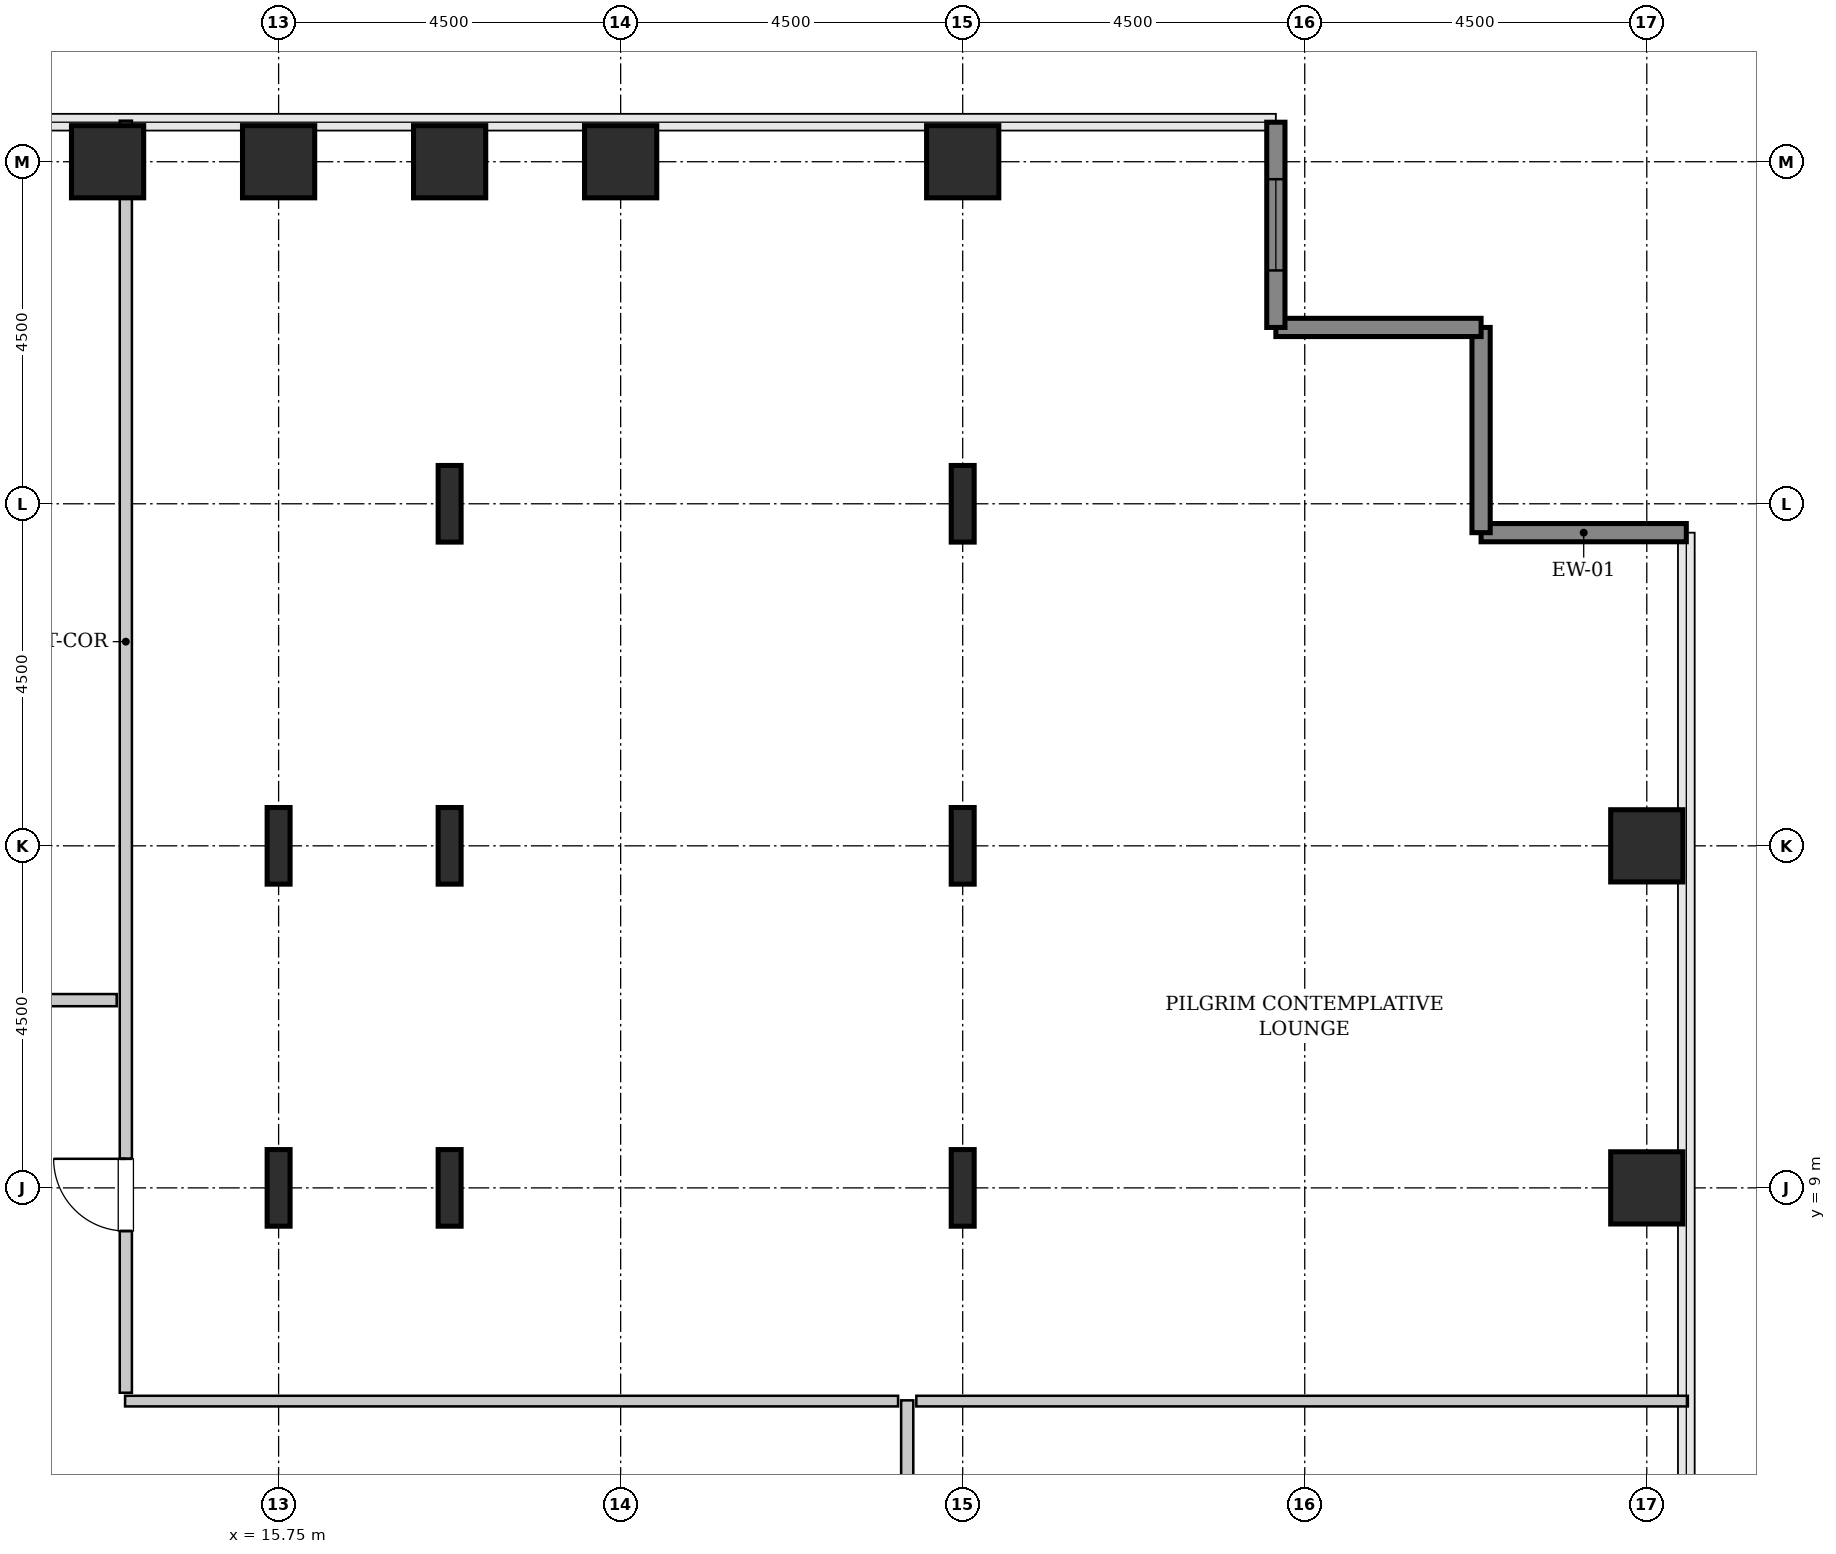
"""IFC4 building model, lengths in metres.
Left out: names, types, materials, properties, quantities, classifications, styles, units other than length and angle.
Written with IfcOpenShell. Run it as: python <this file> out.ifc"""

import sys

from ifc_helpers import new_model, si_unit, direction, frame, frame_2d, origin, origin_2d, place, context, subcontext, project, spatial, rectangle, hollow_rectangle, i_section, extrude, source, transform, mapped, element, fill, save


model = new_model("IFC4")
c1 = context("Model", 3, precision=1e-05, world=origin(), true_north=direction((0.0, 1.0)))
c2 = subcontext(c1, "Body", "Model", "MODEL_VIEW")
j1 = project(units=[si_unit("LENGTHUNIT", "METRE"), si_unit("PLANEANGLEUNIT", "RADIAN")], contexts=[c1])
p1 = place(None, origin())
s1 = spatial("IfcSite", under=j1, at=p1, CompositionType="ELEMENT")
p2 = place(p1, origin())
s2 = spatial("IfcBuilding", under=s1, at=p2, CompositionType="ELEMENT")
p3 = place(p2, frame((0.0, 0.0, 48.2)))
s3 = spatial("IfcBuildingStorey", under=s2, at=p3, CompositionType="ELEMENT", Elevation=48.2)
m1 = source(origin(), c2, "Body", "SweptSolid", [
    extrude(hollow_rectangle(XDim=0.95, YDim=0.95, WallThickness=0.045, InnerFilletRadius=0.045, OuterFilletRadius=0.09, at=origin_2d()), origin(), (0.0, 0.0, 1.0), 3.8),
])
p4 = place(p3, frame((13.5, 22.5, 0.0), z_axis=(0.0, 0.0, 1.0), x_axis=(1.0, 0.0, 0.0)))
e1 = element("IfcColumn", 1, at=p4, inside=s3, PredefinedType="COLUMN", context=c2, shape_type="MappedRepresentation", body=[
    mapped(m1, transform((0.0, 0.0, 0.0), x_axis=(1.0, 0.0, 0.0), y_axis=(0.0, 1.0, 0.0), z_axis=(0.0, 0.0, 1.0), scale=1.0)),
])
m2 = source(origin(), c2, "Body", "SweptSolid", [
    extrude(i_section(OverallWidth=0.302, OverallDepth=1.008, WebThickness=0.021, FlangeThickness=0.04, FilletRadius=0.03, at=origin_2d()), origin(), (0.0, 0.0, 1.0), 3.8),
])
for number, where, z_axis, x_axis in (
    (2, (15.75, 9.0, 0.0), (0.0, 0.0, 1.0), (1.0, 0.0, 0.0)),
    (3, (15.75, 13.5, 0.0), (0.0, 0.0, 1.0), (1.0, 0.0, 0.0)),
):
    element("IfcColumn", number, at=place(p3, frame(where, z_axis=z_axis, x_axis=x_axis)), inside=s3, PredefinedType="COLUMN", context=c2, shape_type="MappedRepresentation", body=[
        mapped(m2, transform((0.0, 0.0, 0.0), x_axis=(1.0, 0.0, 0.0), y_axis=(0.0, 1.0, 0.0), z_axis=(0.0, 0.0, 1.0), scale=1.0)),
    ])
p5 = place(p3, frame((15.75, 22.5, 0.0), z_axis=(0.0, 0.0, 1.0), x_axis=(1.0, 0.0, 0.0)))
e4 = element("IfcColumn", 4, at=p5, inside=s3, PredefinedType="COLUMN", context=c2, shape_type="MappedRepresentation", body=[
    mapped(m1, transform((0.0, 0.0, 0.0), x_axis=(1.0, 0.0, 0.0), y_axis=(0.0, 1.0, 0.0), z_axis=(0.0, 0.0, 1.0), scale=1.0)),
])
for number, where, z_axis, x_axis in (
    (5, (18.0, 9.0, 0.0), (0.0, 0.0, 1.0), (1.0, 0.0, 0.0)),
    (6, (18.0, 13.5, 0.0), (0.0, 0.0, 1.0), (1.0, 0.0, 0.0)),
    (7, (18.0, 18.0, 0.0), (0.0, 0.0, 1.0), (1.0, 0.0, 0.0)),
):
    element("IfcColumn", number, at=place(p3, frame(where, z_axis=z_axis, x_axis=x_axis)), inside=s3, PredefinedType="COLUMN", context=c2, shape_type="MappedRepresentation", body=[
        mapped(m2, transform((0.0, 0.0, 0.0), x_axis=(1.0, 0.0, 0.0), y_axis=(0.0, 1.0, 0.0), z_axis=(0.0, 0.0, 1.0), scale=1.0)),
    ])
for number, where, z_axis, x_axis in (
    (8, (18.0, 22.5, 0.0), (0.0, 0.0, 1.0), (1.0, 0.0, 0.0)),
    (9, (20.25, 22.5, 0.0), (0.0, 0.0, 1.0), (1.0, 0.0, 0.0)),
):
    element("IfcColumn", number, at=place(p3, frame(where, z_axis=z_axis, x_axis=x_axis)), inside=s3, PredefinedType="COLUMN", context=c2, shape_type="MappedRepresentation", body=[
        mapped(m1, transform((0.0, 0.0, 0.0), x_axis=(1.0, 0.0, 0.0), y_axis=(0.0, 1.0, 0.0), z_axis=(0.0, 0.0, 1.0), scale=1.0)),
    ])
for number, where, z_axis, x_axis in (
    (10, (24.75, 9.0, 0.0), (0.0, 0.0, 1.0), (1.0, 0.0, 0.0)),
    (11, (24.75, 13.5, 0.0), (0.0, 0.0, 1.0), (1.0, 0.0, 0.0)),
    (12, (24.75, 18.0, 0.0), (0.0, 0.0, 1.0), (1.0, 0.0, 0.0)),
):
    element("IfcColumn", number, at=place(p3, frame(where, z_axis=z_axis, x_axis=x_axis)), inside=s3, PredefinedType="COLUMN", context=c2, shape_type="MappedRepresentation", body=[
        mapped(m2, transform((0.0, 0.0, 0.0), x_axis=(1.0, 0.0, 0.0), y_axis=(0.0, 1.0, 0.0), z_axis=(0.0, 0.0, 1.0), scale=1.0)),
    ])
for number, where, z_axis, x_axis in (
    (13, (24.75, 22.5, 0.0), (0.0, 0.0, 1.0), (1.0, 0.0, 0.0)),
    (14, (33.75, 9.0, 0.0), (0.0, 0.0, 1.0), (1.0, 0.0, 0.0)),
    (15, (33.75, 13.5, 0.0), (0.0, 0.0, 1.0), (1.0, 0.0, 0.0)),
):
    element("IfcColumn", number, at=place(p3, frame(where, z_axis=z_axis, x_axis=x_axis)), inside=s3, PredefinedType="COLUMN", context=c2, shape_type="MappedRepresentation", body=[
        mapped(m1, transform((0.0, 0.0, 0.0), x_axis=(1.0, 0.0, 0.0), y_axis=(0.0, 1.0, 0.0), z_axis=(0.0, 0.0, 1.0), scale=1.0)),
    ])
m3 = source(origin(), c2, "Body", "SweptSolid", [
    extrude(rectangle(XDim=2.7, YDim=0.24, at=frame_2d((1.35, 0.0))), origin(), (0.0, 0.0, 1.0), 3.55),
])
for number, where, z_axis, x_axis in (
    (16, (34.27, 17.62, 0.0), (0.0, 0.0, 1.0), (-1.0, 0.0, 0.0)),
    (17, (31.57, 17.62, 0.0), (0.0, 0.0, 1.0), (0.0, 1.0, 0.0)),
    (18, (31.57, 20.32, 0.0), (0.0, 0.0, 1.0), (-1.0, 0.0, 0.0)),
):
    element("IfcWall", number, at=place(p3, frame(where, z_axis=z_axis, x_axis=x_axis)), inside=s3, PredefinedType="SHEAR", context=c2, shape_type="MappedRepresentation", body=[
        mapped(m3, transform((0.0, 0.0, 0.0), x_axis=(1.0, 0.0, 0.0), y_axis=(0.0, 1.0, 0.0), z_axis=(0.0, 0.0, 1.0), scale=1.0)),
    ])
p6 = place(p3, frame((28.87, 20.32, 0.0), z_axis=(0.0, 0.0, 1.0), x_axis=(0.0, 1.0, 0.0)))
e19 = element("IfcWall", 19, at=p6, inside=s3, PredefinedType="SHEAR", context=c2, shape_type="MappedRepresentation", body=[
    mapped(m3, transform((0.0, 0.0, 0.0), x_axis=(1.0, 0.0, 0.0), y_axis=(0.0, 1.0, 0.0), z_axis=(0.0, 0.0, 1.0), scale=1.0)),
])
p7 = place(p6, frame((0.75, 0.0, 0.85)))
e20 = element("IfcOpeningElement", 20, at=p7, cuts=e19, PredefinedType="OPENING", context=c2, shape_type="SweptSolid", body=[
    extrude(rectangle(XDim=1.2, YDim=1.8, at=frame_2d((0.6, 0.9))), frame((0.0, 0.13, 0.0), z_axis=(0.0, -1.0, 0.0), x_axis=(1.0, 0.0, 0.0)), (0.0, 0.0, 1.0), 0.26),
])
m4 = source(origin(), c2, "Body", "SweptSolid", [
    extrude(rectangle(XDim=13.3, YDim=0.16, at=frame_2d((6.65, 0.0))), origin(), (0.0, 0.0, 1.0), 3.535),
])
p8 = place(p3, frame((24.02, -7.095, 0.0), z_axis=(0.0, 0.0, 1.0), x_axis=(0.0, 1.0, 0.0)))
e21 = element("IfcWall", 21, at=p8, inside=s3, PredefinedType="PARTITIONING", context=c2, shape_type="MappedRepresentation", body=[
    mapped(m4, transform((0.0, 0.0, 0.0), x_axis=(1.0, 0.0, 0.0), y_axis=(0.0, 1.0, 0.0), z_axis=(0.0, 0.0, 1.0), scale=1.0)),
])
p9 = place(p8, frame((8.87, 0.0, 0.0)))
e22 = element("IfcOpeningElement", 22, at=p9, cuts=e21, PredefinedType="OPENING", context=c2, shape_type="SweptSolid", body=[
    extrude(rectangle(XDim=0.95, YDim=2.1, at=frame_2d((0.475, 1.05))), frame((0.0, 0.09, 0.0), z_axis=(0.0, -1.0, 0.0), x_axis=(1.0, 0.0, 0.0)), (0.0, 0.0, 1.0), 0.18),
])
m5 = source(origin(), c2, "Body", "SweptSolid", [
    extrude(rectangle(XDim=10.17, YDim=0.14, at=frame_2d((5.085, 0.0))), origin(), (0.0, 0.0, 1.0), 3.535),
])
p10 = place(p3, frame((13.73, 6.195, 0.0), z_axis=(0.0, 0.0, 1.0), x_axis=(1.0, 0.0, 0.0)))
e23 = element("IfcWall", 23, at=p10, inside=s3, PredefinedType="PARTITIONING", context=c2, shape_type="MappedRepresentation", body=[
    mapped(m5, transform((0.0, 0.0, 0.0), x_axis=(1.0, 0.0, 0.0), y_axis=(0.0, 1.0, 0.0), z_axis=(0.0, 0.0, 1.0), scale=1.0)),
])
m6 = source(origin(), c2, "Body", "SweptSolid", [
    extrude(rectangle(XDim=10.15, YDim=0.14, at=frame_2d((5.075, 0.0))), origin(), (0.0, 0.0, 1.0), 3.535),
])
p11 = place(p3, frame((24.14, 6.195, 0.0), z_axis=(0.0, 0.0, 1.0), x_axis=(1.0, 0.0, 0.0)))
e24 = element("IfcWall", 24, at=p11, inside=s3, PredefinedType="PARTITIONING", context=c2, shape_type="MappedRepresentation", body=[
    mapped(m6, transform((0.0, 0.0, 0.0), x_axis=(1.0, 0.0, 0.0), y_axis=(0.0, 1.0, 0.0), z_axis=(0.0, 0.0, 1.0), scale=1.0)),
])
m7 = source(origin(), c2, "Body", "SweptSolid", [
    extrude(rectangle(XDim=16.735, YDim=0.16, at=frame_2d((8.368, 0.0))), origin(), (0.0, 0.0, 1.0), 3.535),
])
p12 = place(p3, frame((13.74, 6.305, 0.0), z_axis=(0.0, 0.0, 1.0), x_axis=(0.0, 1.0, 0.0)))
e25 = element("IfcWall", 25, at=p12, inside=s3, PredefinedType="PARTITIONING", context=c2, shape_type="MappedRepresentation", body=[
    mapped(m7, transform((0.0, 0.0, 0.0), x_axis=(1.0, 0.0, 0.0), y_axis=(0.0, 1.0, 0.0), z_axis=(0.0, 0.0, 1.0), scale=1.0)),
])
p13 = place(p12, frame((2.127, 0.0, 0.0)))
e26 = element("IfcOpeningElement", 26, at=p13, cuts=e25, PredefinedType="OPENING", context=c2, shape_type="SweptSolid", body=[
    extrude(rectangle(XDim=0.95, YDim=2.1, at=frame_2d((0.475, 1.05))), frame((0.0, 0.09, 0.0), z_axis=(0.0, -1.0, 0.0), x_axis=(1.0, 0.0, 0.0)), (0.0, 0.0, 1.0), 0.18),
])
m8 = source(origin(), c2, "Body", "SweptSolid", [
    extrude(rectangle(XDim=6.825, YDim=0.16, at=frame_2d((3.413, 0.0))), origin(), (0.0, 0.0, 1.0), 3.535),
])
p14 = place(p3, frame((6.795, 11.47, 0.0), z_axis=(0.0, 0.0, 1.0), x_axis=(1.0, 0.0, 0.0)))
e27 = element("IfcWall", 27, at=p14, inside=s3, PredefinedType="PARTITIONING", context=c2, shape_type="MappedRepresentation", body=[
    mapped(m8, transform((0.0, 0.0, 0.0), x_axis=(1.0, 0.0, 0.0), y_axis=(0.0, 1.0, 0.0), z_axis=(0.0, 0.0, 1.0), scale=1.0)),
])
p15 = place(p14, frame((2.938, 0.0, 0.0)))
e28 = element("IfcOpeningElement", 28, at=p15, cuts=e27, PredefinedType="OPENING", context=c2, shape_type="SweptSolid", body=[
    extrude(rectangle(XDim=0.95, YDim=2.1, at=frame_2d((0.475, 1.05))), frame((0.0, 0.09, 0.0), z_axis=(0.0, -1.0, 0.0), x_axis=(1.0, 0.0, 0.0)), (0.0, 0.0, 1.0), 0.18),
])
m9 = source(origin(), c2, "Body", "SweptSolid", [
    extrude(rectangle(XDim=1.2, YDim=1.8, at=frame_2d((0.6, 0.9))), frame((0.0, 0.03, 0.0), z_axis=(0.0, -1.0, 0.0), x_axis=(1.0, 0.0, 0.0)), (0.0, 0.0, 1.0), 0.06),
])
p16 = place(p7, origin())
e29 = element("IfcWindow", 29, at=p16, inside=s3, PartitioningType="SINGLE_PANEL", PredefinedType="WINDOW", context=c2, shape_type="MappedRepresentation", body=[
    mapped(m9, transform((0.0, 0.0, 0.0), x_axis=(1.0, 0.0, 0.0), y_axis=(0.0, 1.0, 0.0), z_axis=(0.0, 0.0, 1.0), scale=1.0)),
])
fill(e20, e29)
m10 = source(origin(), c2, "Body", "SweptSolid", [
    extrude(rectangle(XDim=0.95, YDim=2.1, at=frame_2d((0.475, 1.05))), frame((0.0, 0.025, 0.0), z_axis=(0.0, -1.0, 0.0), x_axis=(1.0, 0.0, 0.0)), (0.0, 0.0, 1.0), 0.05),
])
p17 = place(p13, origin())
e30 = element("IfcDoor", 30, at=p17, inside=s3, OperationType="SINGLE_SWING_RIGHT", PredefinedType="DOOR", context=c2, shape_type="MappedRepresentation", body=[
    mapped(m10, transform((0.0, 0.0, 0.0), x_axis=(1.0, 0.0, 0.0), y_axis=(0.0, 1.0, 0.0), z_axis=(0.0, 0.0, 1.0), scale=1.0)),
])
fill(e26, e30)
save(model, sys.argv[1])
